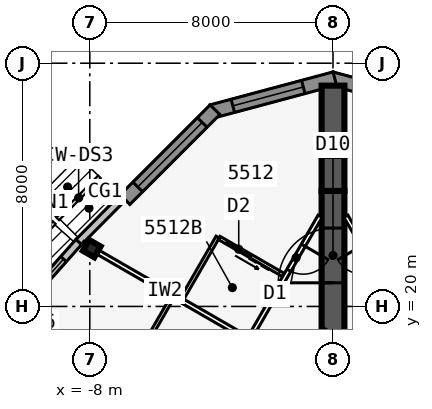
"""IFC4 building model, lengths in metres.
Left out: names, types, materials, properties, quantities, classifications, styles, units other than length and angle.
Written with IfcOpenShell. Run it as: python <this file> out.ifc"""

import sys

from ifc_helpers import new_model, si_unit, direction, frame, frame_2d, origin, origin_2d, place, context, subcontext, project, spatial, polyline, rectangle, i_section, outline, extrude, element, fill, save


model = new_model("IFC4")
c1 = context("Model", 3, precision=1e-05, world=origin(), true_north=direction((0.0, 1.0)))
c2 = subcontext(c1, "Body", "Model", "MODEL_VIEW")
j1 = project(units=[si_unit("LENGTHUNIT", "METRE"), si_unit("PLANEANGLEUNIT", "RADIAN")], contexts=[c1])
p1 = place(None, origin())
s1 = spatial("IfcSite", under=j1, at=p1, CompositionType="ELEMENT")
p2 = place(p1, origin())
s2 = spatial("IfcBuilding", under=s1, at=p2, CompositionType="ELEMENT")
p3 = place(p2, frame((0.0, 0.0, 208.1)))
s3 = spatial("IfcBuildingStorey", under=s2, at=p3, CompositionType="ELEMENT", Elevation=208.1)
p4 = place(p3, frame((16.5, -9.526, 0.0), z_axis=(0.0, 0.0, 1.0), x_axis=(-0.499999749417, 0.866025548458, 0.0)))
e1 = element("IfcWall", 1, at=p4, inside=s3, PredefinedType="SHEAR", context=c2, shape_type="SweptSolid", body=[
    extrude(rectangle(XDim=33.0, YDim=0.75, at=frame_2d((16.5, 0.0))), origin(), (0.0, 0.0, 1.0), 3.6),
])
p5 = place(p4, frame((14.15, 0.0, 0.0)))
e2 = element("IfcOpeningElement", 2, at=p5, cuts=e1, PredefinedType="OPENING", context=c2, shape_type="SweptSolid", body=[
    extrude(rectangle(XDim=1.8, YDim=2.13, at=frame_2d((0.9, 1.065))), frame((0.0, 0.385, 0.0), z_axis=(0.0, -1.0, 0.0), x_axis=(1.0, 0.0, 0.0)), (0.0, 0.0, 1.0), 0.77),
])
p6 = place(p4, frame((12.6, 0.0, 0.0)))
e3 = element("IfcOpeningElement", 3, at=p6, cuts=e1, PredefinedType="OPENING", context=c2, shape_type="SweptSolid", body=[
    extrude(rectangle(XDim=1.0, YDim=2.13, at=frame_2d((0.5, 1.065))), frame((0.0, 0.385, 0.0), z_axis=(0.0, -1.0, 0.0), x_axis=(1.0, 0.0, 0.0)), (0.0, 0.0, 1.0), 0.77),
])
p7 = place(p3, frame((0.0, 19.052, 0.0), z_axis=(0.0, 0.0, 1.0), x_axis=(-0.499999749417, -0.866025548458, 0.0)))
e4 = element("IfcWall", 4, at=p7, inside=s3, PredefinedType="SHEAR", context=c2, shape_type="SweptSolid", body=[
    extrude(rectangle(XDim=33.0, YDim=0.75, at=frame_2d((16.5, 0.0))), origin(), (0.0, 0.0, 1.0), 3.6),
])
p8 = place(p7, frame((14.15, 0.0, 0.0)))
e5 = element("IfcOpeningElement", 5, at=p8, cuts=e4, PredefinedType="OPENING", context=c2, shape_type="SweptSolid", body=[
    extrude(rectangle(XDim=1.8, YDim=2.13, at=frame_2d((0.9, 1.065))), frame((0.0, 0.385, 0.0), z_axis=(0.0, -1.0, 0.0), x_axis=(1.0, 0.0, 0.0)), (0.0, 0.0, 1.0), 0.77),
])
p9 = place(p7, frame((12.6, 0.0, 0.0)))
e6 = element("IfcOpeningElement", 6, at=p9, cuts=e4, PredefinedType="OPENING", context=c2, shape_type="SweptSolid", body=[
    extrude(rectangle(XDim=1.0, YDim=2.13, at=frame_2d((0.5, 1.065))), frame((0.0, 0.385, 0.0), z_axis=(0.0, -1.0, 0.0), x_axis=(1.0, 0.0, 0.0)), (0.0, 0.0, 1.0), 0.77),
])
p10 = place(p3, frame((0.0, 19.052, 0.0), z_axis=(0.0, 0.0, 1.0), x_axis=(0.0, 1.0, 0.0)))
e7 = element("IfcWall", 7, at=p10, inside=s3, PredefinedType="SHEAR", context=c2, shape_type="SweptSolid", body=[
    extrude(rectangle(XDim=4.746, YDim=0.75, at=frame_2d((2.373, 0.0))), origin(), (0.0, 0.0, 1.0), 3.6),
])
p11 = place(p10, frame((1.725, 0.0, 0.0)))
e8 = element("IfcOpeningElement", 8, at=p11, cuts=e7, PredefinedType="OPENING", context=c2, shape_type="SweptSolid", body=[
    extrude(rectangle(XDim=1.8, YDim=2.13, at=frame_2d((0.9, 1.065))), frame((0.0, 0.385, 0.0), z_axis=(0.0, -1.0, 0.0), x_axis=(1.0, 0.0, 0.0)), (0.0, 0.0, 1.0), 0.77),
])
p12 = place(p3, frame((0.0, 23.799, 0.0), z_axis=(0.0, 0.0, 1.0), x_axis=(0.0, 1.0, 0.0)))
e9 = element("IfcWall", 9, at=p12, inside=s3, PredefinedType="SHEAR", context=c2, shape_type="SweptSolid", body=[
    extrude(rectangle(XDim=1.155, YDim=0.75, at=frame_2d((0.577, 0.0))), origin(), (0.0, 0.0, 1.0), 3.6),
])
p13 = place(p3, frame((0.0, 24.953, 0.0), z_axis=(0.0, 0.0, 1.0), x_axis=(0.0, 1.0, 0.0)))
e10 = element("IfcWall", 10, at=p13, inside=s3, PredefinedType="SHEAR", context=c2, shape_type="SweptSolid", body=[
    extrude(rectangle(XDim=2.309, YDim=0.75, at=frame_2d((1.155, 0.0))), origin(), (0.0, 0.0, 1.0), 3.6),
])
p14 = place(p3, frame((-7.937, 21.903, 0.0), z_axis=(0.0, 0.0, 1.0), x_axis=(-0.5, -0.866025403784, 0.0)))
e11 = element("IfcColumn", 11, at=p14, inside=s3, PredefinedType="COLUMN", context=c2, shape_type="SweptSolid", body=[
    extrude(i_section(OverallWidth=0.411, OverallDepth=0.434, WebThickness=0.036, FlangeThickness=0.057, at=origin_2d()), origin(), (0.0, 0.0, 1.0), 3.6),
])
p15 = place(p3, frame((3.983, 26.413, 0.0), z_axis=(0.0, 0.0, 1.0), x_axis=(-0.965920442324, 0.258839137498, 0.0)))
e12 = element("IfcWall", 12, at=p15, inside=s3, PredefinedType="SOLIDWALL", context=c2, shape_type="SweptSolid", body=[
    extrude(outline(polyline([(4.184, 0.225), (4.124, 0.225), (3.706, 0.113), (3.676, 0.225), (0.0, 0.225), (0.0, -0.225), (4.184, -0.225), (4.184, 0.225)])), origin(), (0.0, 0.0, 1.0), 3.435),
])
p16 = place(p15, frame((0.713, 0.0, 0.45)))
e13 = element("IfcOpeningElement", 13, at=p16, cuts=e12, PredefinedType="OPENING", context=c2, shape_type="SweptSolid", body=[
    extrude(rectangle(XDim=2.4, YDim=2.6, at=frame_2d((1.2, 1.3))), frame((0.0, 0.235, 0.0), z_axis=(0.0, -1.0, 0.0), x_axis=(1.0, 0.0, 0.0)), (0.0, 0.0, 1.0), 0.47),
])
p17 = place(p3, frame((0.058, 27.496, 0.0), z_axis=(0.0, 0.0, 1.0), x_axis=(-0.965920442324, -0.258839137498, 0.0)))
e14 = element("IfcWall", 14, at=p17, inside=s3, PredefinedType="SOLIDWALL", context=c2, shape_type="SweptSolid", body=[
    extrude(outline(polyline([(4.184, 0.225), (0.509, 0.225), (0.479, 0.113), (0.06, 0.225), (0.0, 0.225), (0.0, -0.225), (4.184, -0.225), (4.184, 0.225)])), origin(), (0.0, 0.0, 1.0), 3.435),
])
p18 = place(p17, frame((1.071, 0.0, 0.45)))
e15 = element("IfcOpeningElement", 15, at=p18, cuts=e14, PredefinedType="OPENING", context=c2, shape_type="SweptSolid", body=[
    extrude(rectangle(XDim=2.4, YDim=2.6, at=frame_2d((1.2, 1.3))), frame((0.0, 0.235, 0.0), z_axis=(0.0, -1.0, 0.0), x_axis=(1.0, 0.0, 0.0)), (0.0, 0.0, 1.0), 0.47),
])
p19 = place(p3, frame((-3.882, 26.471, 0.0), z_axis=(0.0, 0.0, 1.0), x_axis=(-0.707106781187, -0.707106781187, 0.0)))
e16 = element("IfcWall", 16, at=p19, inside=s3, PredefinedType="SOLIDWALL", context=c2, shape_type="SweptSolid", body=[
    extrude(rectangle(XDim=4.184, YDim=0.45, at=frame_2d((2.092, 0.0))), origin(), (0.0, 0.0, 1.0), 3.435),
])
p20 = place(p19, frame((0.592, 0.0, 0.45)))
e17 = element("IfcOpeningElement", 17, at=p20, cuts=e16, PredefinedType="OPENING", context=c2, shape_type="SweptSolid", body=[
    extrude(rectangle(XDim=3.0, YDim=2.6, at=frame_2d((1.5, 1.3))), frame((0.0, 0.235, 0.0), z_axis=(0.0, -1.0, 0.0), x_axis=(1.0, 0.0, 0.0)), (0.0, 0.0, 1.0), 0.47),
])
p21 = place(p3, frame((-6.911, 23.583, 0.0), z_axis=(0.0, 0.0, 1.0), x_axis=(-0.704149946111, -0.710051303352, 0.0)))
e18 = element("IfcWall", 18, at=p21, inside=s3, PredefinedType="STANDARD", context=c2, shape_type="SweptSolid", body=[
    extrude(rectangle(XDim=2.069, YDim=0.25, at=frame_2d((1.034, 0.0))), origin(), (0.0, 0.0, 1.0), 3.435),
])
p22 = place(p3, frame((-8.363, 22.12, 0.0), z_axis=(0.0, 0.0, 1.0), x_axis=(-0.664348996191, -0.747422511876, 0.0)))
e19 = element("IfcWall", 19, at=p22, inside=s3, PredefinedType="STANDARD", context=c2, shape_type="SweptSolid", body=[
    extrude(rectangle(XDim=5.105, YDim=0.25, at=frame_2d((2.552, 0.0))), origin(), (0.0, 0.0, 1.0), 3.435),
])
p23 = place(p22, frame((0.752, 0.0, 0.45)))
e20 = element("IfcOpeningElement", 20, at=p23, cuts=e19, PredefinedType="OPENING", context=c2, shape_type="SweptSolid", body=[
    extrude(rectangle(XDim=3.6, YDim=2.6, at=frame_2d((1.8, 1.3))), frame((0.0, 0.135, 0.0), z_axis=(0.0, -1.0, 0.0), x_axis=(1.0, 0.0, 0.0)), (0.0, 0.0, 1.0), 0.27),
])
p24 = place(p3, frame((20.102, -11.115, 0.0), z_axis=(0.0, 0.0, 1.0), x_axis=(-0.500000265775, 0.866025250339, 0.0)))
e21 = element("IfcWall", 21, at=p24, inside=s3, PredefinedType="PARTITIONING", context=c2, shape_type="SweptSolid", body=[
    extrude(rectangle(XDim=39.354, YDim=0.15, at=frame_2d((19.677, 0.0))), origin(), (0.0, 0.0, 1.0), 3.435),
])
p25 = place(p24, frame((1.665, 0.0, 0.0)))
e22 = element("IfcOpeningElement", 22, at=p25, cuts=e21, PredefinedType="OPENING", context=c2, shape_type="SweptSolid", body=[
    extrude(rectangle(XDim=0.95, YDim=2.13, at=frame_2d((0.475, 1.065))), frame((0.0, 0.085, 0.0), z_axis=(0.0, -1.0, 0.0), x_axis=(1.0, 0.0, 0.0)), (0.0, 0.0, 1.0), 0.17),
])
p26 = place(p24, frame((12.902, 0.0, 0.0)))
e23 = element("IfcOpeningElement", 23, at=p26, cuts=e21, PredefinedType="OPENING", context=c2, shape_type="SweptSolid", body=[
    extrude(rectangle(XDim=0.95, YDim=2.13, at=frame_2d((0.475, 1.065))), frame((0.0, 0.085, 0.0), z_axis=(0.0, -1.0, 0.0), x_axis=(1.0, 0.0, 0.0)), (0.0, 0.0, 1.0), 0.17),
])
p27 = place(p24, frame((17.302, 0.0, 0.0)))
e24 = element("IfcOpeningElement", 24, at=p27, cuts=e21, PredefinedType="OPENING", context=c2, shape_type="SweptSolid", body=[
    extrude(rectangle(XDim=0.95, YDim=2.13, at=frame_2d((0.475, 1.065))), frame((0.0, 0.085, 0.0), z_axis=(0.0, -1.0, 0.0), x_axis=(1.0, 0.0, 0.0)), (0.0, 0.0, 1.0), 0.17),
])
p28 = place(p24, frame((22.902, 0.0, 0.0)))
e25 = element("IfcOpeningElement", 25, at=p28, cuts=e21, PredefinedType="OPENING", context=c2, shape_type="SweptSolid", body=[
    extrude(rectangle(XDim=0.95, YDim=2.13, at=frame_2d((0.475, 1.065))), frame((0.0, 0.085, 0.0), z_axis=(0.0, -1.0, 0.0), x_axis=(1.0, 0.0, 0.0)), (0.0, 0.0, 1.0), 0.17),
])
p29 = place(p24, frame((32.302, 0.0, 0.0)))
e26 = element("IfcOpeningElement", 26, at=p29, cuts=e21, PredefinedType="OPENING", context=c2, shape_type="SweptSolid", body=[
    extrude(rectangle(XDim=0.95, YDim=2.13, at=frame_2d((0.475, 1.065))), frame((0.0, 0.085, 0.0), z_axis=(0.0, -1.0, 0.0), x_axis=(1.0, 0.0, 0.0)), (0.0, 0.0, 1.0), 0.17),
])
p30 = place(p24, frame((37.302, 0.0, 0.0)))
e27 = element("IfcOpeningElement", 27, at=p30, cuts=e21, PredefinedType="OPENING", context=c2, shape_type="SweptSolid", body=[
    extrude(rectangle(XDim=0.95, YDim=2.13, at=frame_2d((0.475, 1.065))), frame((0.0, 0.085, 0.0), z_axis=(0.0, -1.0, 0.0), x_axis=(1.0, 0.0, 0.0)), (0.0, 0.0, 1.0), 0.17),
])
p31 = place(p3, frame((-0.425, 22.966, 0.0), z_axis=(0.0, 0.0, 1.0), x_axis=(-0.500000265775, -0.866025250339, 0.0)))
e28 = element("IfcWall", 28, at=p31, inside=s3, PredefinedType="PARTITIONING", context=c2, shape_type="SweptSolid", body=[
    extrude(rectangle(XDim=39.354, YDim=0.15, at=frame_2d((19.677, 0.0))), origin(), (0.0, 0.0, 1.0), 3.435),
])
p32 = place(p31, frame((1.102, 0.0, 0.0)))
e29 = element("IfcOpeningElement", 29, at=p32, cuts=e28, PredefinedType="OPENING", context=c2, shape_type="SweptSolid", body=[
    extrude(rectangle(XDim=0.95, YDim=2.13, at=frame_2d((0.475, 1.065))), frame((0.0, 0.085, 0.0), z_axis=(0.0, -1.0, 0.0), x_axis=(1.0, 0.0, 0.0)), (0.0, 0.0, 1.0), 0.17),
])
p33 = place(p31, frame((7.902, 0.0, 0.0)))
e30 = element("IfcOpeningElement", 30, at=p33, cuts=e28, PredefinedType="OPENING", context=c2, shape_type="SweptSolid", body=[
    extrude(rectangle(XDim=0.95, YDim=2.13, at=frame_2d((0.475, 1.065))), frame((0.0, 0.085, 0.0), z_axis=(0.0, -1.0, 0.0), x_axis=(1.0, 0.0, 0.0)), (0.0, 0.0, 1.0), 0.17),
])
p34 = place(p31, frame((17.302, 0.0, 0.0)))
e31 = element("IfcOpeningElement", 31, at=p34, cuts=e28, PredefinedType="OPENING", context=c2, shape_type="SweptSolid", body=[
    extrude(rectangle(XDim=0.95, YDim=2.13, at=frame_2d((0.475, 1.065))), frame((0.0, 0.085, 0.0), z_axis=(0.0, -1.0, 0.0), x_axis=(1.0, 0.0, 0.0)), (0.0, 0.0, 1.0), 0.17),
])
p35 = place(p31, frame((26.702, 0.0, 0.0)))
e32 = element("IfcOpeningElement", 32, at=p35, cuts=e28, PredefinedType="OPENING", context=c2, shape_type="SweptSolid", body=[
    extrude(rectangle(XDim=0.95, YDim=2.13, at=frame_2d((0.475, 1.065))), frame((0.0, 0.085, 0.0), z_axis=(0.0, -1.0, 0.0), x_axis=(1.0, 0.0, 0.0)), (0.0, 0.0, 1.0), 0.17),
])
p36 = place(p31, frame((37.302, 0.0, 0.0)))
e33 = element("IfcOpeningElement", 33, at=p36, cuts=e28, PredefinedType="OPENING", context=c2, shape_type="SweptSolid", body=[
    extrude(rectangle(XDim=0.95, YDim=2.13, at=frame_2d((0.475, 1.065))), frame((0.0, 0.085, 0.0), z_axis=(0.0, -1.0, 0.0), x_axis=(1.0, 0.0, 0.0)), (0.0, 0.0, 1.0), 0.17),
])
p37 = place(p3, frame((-2.829, 18.954, 0.0), z_axis=(0.0, 0.0, 1.0), x_axis=(-0.866026604282, 0.499997920671, 0.0)))
e34 = element("IfcWall", 34, at=p37, inside=s3, PredefinedType="PARTITIONING", context=c2, shape_type="SweptSolid", body=[
    extrude(rectangle(XDim=6.24, YDim=0.15, at=frame_2d((3.12, 0.0))), origin(), (0.0, 0.0, 1.0), 2.589),
])
p38 = place(p3, frame((-3.793, 22.282, 0.0), z_axis=(0.0, 0.0, 1.0), x_axis=(-0.500001309137, -0.866024647952, 0.0)))
e35 = element("IfcWall", 35, at=p38, inside=s3, PredefinedType="PLUMBINGWALL", context=c2, shape_type="SweptSolid", body=[
    extrude(rectangle(XDim=2.4, YDim=0.12, at=frame_2d((1.2, 0.0))), origin(), (0.0, 0.0, 1.0), 3.435),
])
p39 = place(p3, frame((-1.628, 21.032, 0.0), z_axis=(0.0, 0.0, 1.0), x_axis=(-0.866048967903, 0.499959183527, 0.0)))
e36 = element("IfcWall", 36, at=p39, inside=s3, PredefinedType="PLUMBINGWALL", context=c2, shape_type="SweptSolid", body=[
    extrude(rectangle(XDim=2.44, YDim=0.12, at=frame_2d((1.22, 0.0))), origin(), (0.0, 0.0, 1.0), 3.435),
])
p40 = place(p39, frame((1.25, 0.0, 0.0)))
e37 = element("IfcOpeningElement", 37, at=p40, cuts=e36, PredefinedType="OPENING", context=c2, shape_type="SweptSolid", body=[
    extrude(rectangle(XDim=0.9, YDim=2.13, at=frame_2d((0.45, 1.065))), frame((0.0, 0.07, 0.0), z_axis=(0.0, -1.0, 0.0), x_axis=(1.0, 0.0, 0.0)), (0.0, 0.0, 1.0), 0.14),
])
p41 = place(p3, frame((-5.253, 20.354, 0.0), z_axis=(0.0, 0.0, 1.0), x_axis=(-0.499990139034, -0.866031096941, 0.0)))
e38 = element("IfcWall", 38, at=p41, inside=s3, PredefinedType="PLUMBINGWALL", context=c2, shape_type="SweptSolid", body=[
    extrude(rectangle(XDim=3.0, YDim=0.12, at=frame_2d((1.5, 0.0))), origin(), (0.0, 0.0, 1.0), 3.435),
])
p42 = place(p18, origin())
e39 = element("IfcWindow", 39, at=p42, inside=s3, PartitioningType="SINGLE_PANEL", PredefinedType="WINDOW", context=c2, shape_type="SweptSolid", body=[
    extrude(rectangle(XDim=2.4, YDim=2.6, at=frame_2d((1.2, 1.3))), frame((0.0, 0.03, 0.0), z_axis=(0.0, -1.0, 0.0), x_axis=(1.0, 0.0, 0.0)), (0.0, 0.0, 1.0), 0.06),
])
fill(e15, e39)
p43 = place(p20, origin())
e40 = element("IfcWindow", 40, at=p43, inside=s3, PartitioningType="SINGLE_PANEL", PredefinedType="WINDOW", context=c2, shape_type="SweptSolid", body=[
    extrude(rectangle(XDim=3.0, YDim=2.6, at=frame_2d((1.5, 1.3))), frame((0.0, 0.03, 0.0), z_axis=(0.0, -1.0, 0.0), x_axis=(1.0, 0.0, 0.0)), (0.0, 0.0, 1.0), 0.06),
])
fill(e17, e40)
p44 = place(p23, origin())
e41 = element("IfcWindow", 41, at=p44, inside=s3, PartitioningType="SINGLE_PANEL", PredefinedType="WINDOW", context=c2, shape_type="SweptSolid", body=[
    extrude(rectangle(XDim=3.6, YDim=2.6, at=frame_2d((1.8, 1.3))), frame((0.0, 0.03, 0.0), z_axis=(0.0, -1.0, 0.0), x_axis=(1.0, 0.0, 0.0)), (0.0, 0.0, 1.0), 0.06),
])
fill(e20, e41)
p45 = place(p40, origin())
e42 = element("IfcDoor", 42, at=p45, inside=s3, OperationType="SLIDING_TO_LEFT", PredefinedType="DOOR", context=c2, shape_type="SweptSolid", body=[
    extrude(rectangle(XDim=0.9, YDim=2.13, at=frame_2d((0.45, 1.065))), frame((0.0, 0.025, 0.0), z_axis=(0.0, -1.0, 0.0), x_axis=(1.0, 0.0, 0.0)), (0.0, 0.0, 1.0), 0.05),
])
fill(e37, e42)
p46 = place(p32, origin())
e43 = element("IfcDoor", 43, at=p46, inside=s3, OperationType="SINGLE_SWING_LEFT", PredefinedType="DOOR", context=c2, shape_type="SweptSolid", body=[
    extrude(rectangle(XDim=0.95, YDim=2.13, at=frame_2d((0.475, 1.065))), frame((0.0, 0.025, 0.0), z_axis=(0.0, -1.0, 0.0), x_axis=(1.0, 0.0, 0.0)), (0.0, 0.0, 1.0), 0.05),
])
fill(e29, e43)
p47 = place(p11, origin())
e44 = element("IfcDoor", 44, at=p47, inside=s3, OperationType="DOUBLE_DOOR_DOUBLE_SWING", PredefinedType="DOOR", context=c2, shape_type="SweptSolid", body=[
    extrude(rectangle(XDim=1.8, YDim=2.13, at=frame_2d((0.9, 1.065))), frame((0.0, 0.025, 0.0), z_axis=(0.0, -1.0, 0.0), x_axis=(1.0, 0.0, 0.0)), (0.0, 0.0, 1.0), 0.05),
])
fill(e8, e44)
save(model, sys.argv[1])
